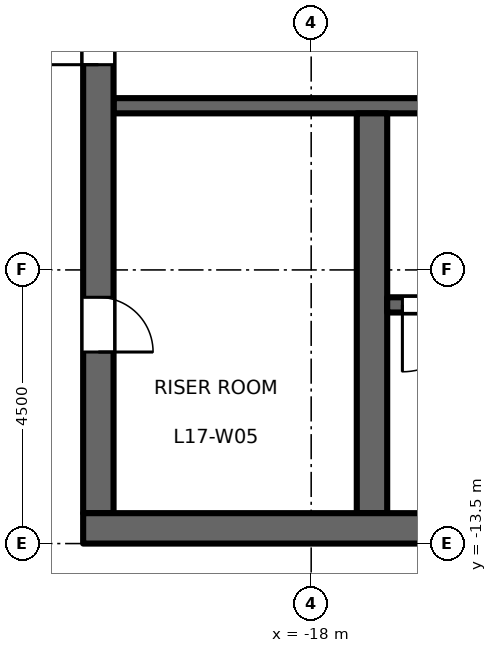
"""IFC4 building model, lengths in metres.
Left out: names, types, materials, properties, quantities, classifications, styles, units other than length and angle.
Written with IfcOpenShell. Run it as: python <this file> out.ifc"""

import sys

from ifc_helpers import new_model, si_unit, direction, frame, frame_2d, origin, place, context, subcontext, project, spatial, rectangle, extrude, element, fill, save


model = new_model("IFC4")
c1 = context("Model", 3, precision=1e-05, world=origin(), true_north=direction((0.0, 1.0)))
c2 = subcontext(c1, "Body", "Model", "MODEL_VIEW")
j1 = project(units=[si_unit("LENGTHUNIT", "METRE"), si_unit("PLANEANGLEUNIT", "RADIAN")], contexts=[c1])
p1 = place(None, origin())
s1 = spatial("IfcSite", under=j1, at=p1, CompositionType="ELEMENT")
p2 = place(p1, origin())
s2 = spatial("IfcBuilding", under=s1, at=p2, CompositionType="ELEMENT")
p3 = place(p2, frame((0.0, 0.0, 80.7)))
s3 = spatial("IfcBuildingStorey", under=s2, at=p3, CompositionType="ELEMENT", Elevation=80.7)
p4 = place(p3, frame((-12.15, -6.3, 0.0), z_axis=(0.0, 0.0, 1.0), x_axis=(-1.0, 0.0, 0.0)))
e1 = element("IfcWall", 1, at=p4, inside=s3, PredefinedType="SHEAR", context=c2, shape_type="SweptSolid", body=[
    extrude(rectangle(XDim=9.1, YDim=0.25, at=frame_2d((4.55, 0.0))), origin(), (0.0, 0.0, 1.0), 4.35),
])
p5 = place(p4, frame((1.8, 0.0, 0.0)))
e2 = element("IfcOpeningElement", 2, at=p5, cuts=e1, PredefinedType="OPENING", context=c2, shape_type="SweptSolid", body=[
    extrude(rectangle(XDim=1.0, YDim=2.1, at=frame_2d((0.5, 1.05))), frame((0.0, 0.135, 0.0), z_axis=(0.0, -1.0, 0.0), x_axis=(1.0, 0.0, 0.0)), (0.0, 0.0, 1.0), 0.27),
])
p6 = place(p3, frame((-21.5, -13.0, 0.0), z_axis=(0.0, 0.0, 1.0), x_axis=(0.0, 1.0, 0.0)))
e3 = element("IfcWall", 3, at=p6, inside=s3, PredefinedType="SHEAR", context=c2, shape_type="SweptSolid", body=[
    extrude(rectangle(XDim=26.0, YDim=0.5, at=frame_2d((13.0, 0.0))), origin(), (0.0, 0.0, 1.0), 4.35),
])
p7 = place(p6, frame((16.825, 0.0, 0.0)))
e4 = element("IfcOpeningElement", 4, at=p7, cuts=e3, PredefinedType="OPENING", context=c2, shape_type="SweptSolid", body=[
    extrude(rectangle(XDim=1.8, YDim=2.1, at=frame_2d((0.9, 1.05))), frame((0.0, 0.26, 0.0), z_axis=(0.0, -1.0, 0.0), x_axis=(1.0, 0.0, 0.0)), (0.0, 0.0, 1.0), 0.52),
])
p8 = place(p6, frame((7.375, 0.0, 0.0)))
e5 = element("IfcOpeningElement", 5, at=p8, cuts=e3, PredefinedType="OPENING", context=c2, shape_type="SweptSolid", body=[
    extrude(rectangle(XDim=1.8, YDim=2.1, at=frame_2d((0.9, 1.05))), frame((0.0, 0.26, 0.0), z_axis=(0.0, -1.0, 0.0), x_axis=(1.0, 0.0, 0.0)), (0.0, 0.0, 1.0), 0.52),
])
p9 = place(p6, frame((2.65, 0.0, 0.0)))
e6 = element("IfcOpeningElement", 6, at=p9, cuts=e3, PredefinedType="OPENING", context=c2, shape_type="SweptSolid", body=[
    extrude(rectangle(XDim=0.9, YDim=2.1, at=frame_2d((0.45, 1.05))), frame((0.0, 0.26, 0.0), z_axis=(0.0, -1.0, 0.0), x_axis=(1.0, 0.0, 0.0)), (0.0, 0.0, 1.0), 0.52),
])
p10 = place(p3, frame((-17.0, -13.0, 0.0), z_axis=(0.0, 0.0, 1.0), x_axis=(0.0, 1.0, 0.0)))
e7 = element("IfcWall", 7, at=p10, inside=s3, PredefinedType="SHEAR", context=c2, shape_type="SweptSolid", body=[
    extrude(rectangle(XDim=6.575, YDim=0.5, at=frame_2d((3.288, 0.0))), origin(), (0.0, 0.0, 1.0), 4.35),
])
p11 = place(p3, frame((-8.75, -9.575, 0.0), z_axis=(0.0, 0.0, 1.0), x_axis=(-1.0, 0.0, 0.0)))
e8 = element("IfcWall", 8, at=p11, inside=s3, PredefinedType="SHEAR", context=c2, shape_type="SweptSolid", body=[
    extrude(rectangle(XDim=8.0, YDim=0.25, at=frame_2d((4.0, 0.0))), origin(), (0.0, 0.0, 1.0), 4.35),
])
p12 = place(p11, frame((6.65, 0.0, 0.0)))
e9 = element("IfcOpeningElement", 9, at=p12, cuts=e8, PredefinedType="OPENING", context=c2, shape_type="SweptSolid", body=[
    extrude(rectangle(XDim=1.1, YDim=2.1, at=frame_2d((0.55, 1.05))), frame((0.0, 0.135, 0.0), z_axis=(0.0, -1.0, 0.0), x_axis=(1.0, 0.0, 0.0)), (0.0, 0.0, 1.0), 0.27),
])
p13 = place(p3, frame((-8.25, -13.25, 0.0), z_axis=(0.0, 0.0, 1.0), x_axis=(-1.0, 0.0, 0.0)))
e10 = element("IfcWall", 10, at=p13, inside=s3, PredefinedType="SHEAR", context=c2, shape_type="SweptSolid", body=[
    extrude(rectangle(XDim=13.5, YDim=0.5, at=frame_2d((6.75, 0.0))), origin(), (0.0, 0.0, 1.0), 4.35),
])
p14 = place(p12, origin())
e11 = element("IfcDoor", 11, at=p14, inside=s3, OperationType="SINGLE_SWING_LEFT", PredefinedType="DOOR", context=c2, shape_type="SweptSolid", body=[
    extrude(rectangle(XDim=1.1, YDim=2.1, at=frame_2d((0.55, 1.05))), frame((0.0, 0.025, 0.0), z_axis=(0.0, -1.0, 0.0), x_axis=(1.0, 0.0, 0.0)), (0.0, 0.0, 1.0), 0.05),
])
fill(e9, e11)
p15 = place(p8, origin())
e12 = element("IfcDoor", 12, at=p15, inside=s3, OperationType="DOUBLE_DOOR_DOUBLE_SWING", PredefinedType="DOOR", context=c2, shape_type="SweptSolid", body=[
    extrude(rectangle(XDim=1.8, YDim=2.1, at=frame_2d((0.9, 1.05))), frame((0.0, 0.025, 0.0), z_axis=(0.0, -1.0, 0.0), x_axis=(1.0, 0.0, 0.0)), (0.0, 0.0, 1.0), 0.05),
])
fill(e5, e12)
p16 = place(p9, origin())
e13 = element("IfcDoor", 13, at=p16, inside=s3, OperationType="SINGLE_SWING_LEFT", PredefinedType="DOOR", context=c2, shape_type="SweptSolid", body=[
    extrude(rectangle(XDim=0.9, YDim=2.1, at=frame_2d((0.45, 1.05))), frame((0.0, 0.025, 0.0), z_axis=(0.0, -1.0, 0.0), x_axis=(1.0, 0.0, 0.0)), (0.0, 0.0, 1.0), 0.05),
])
fill(e6, e13)
save(model, sys.argv[1])
